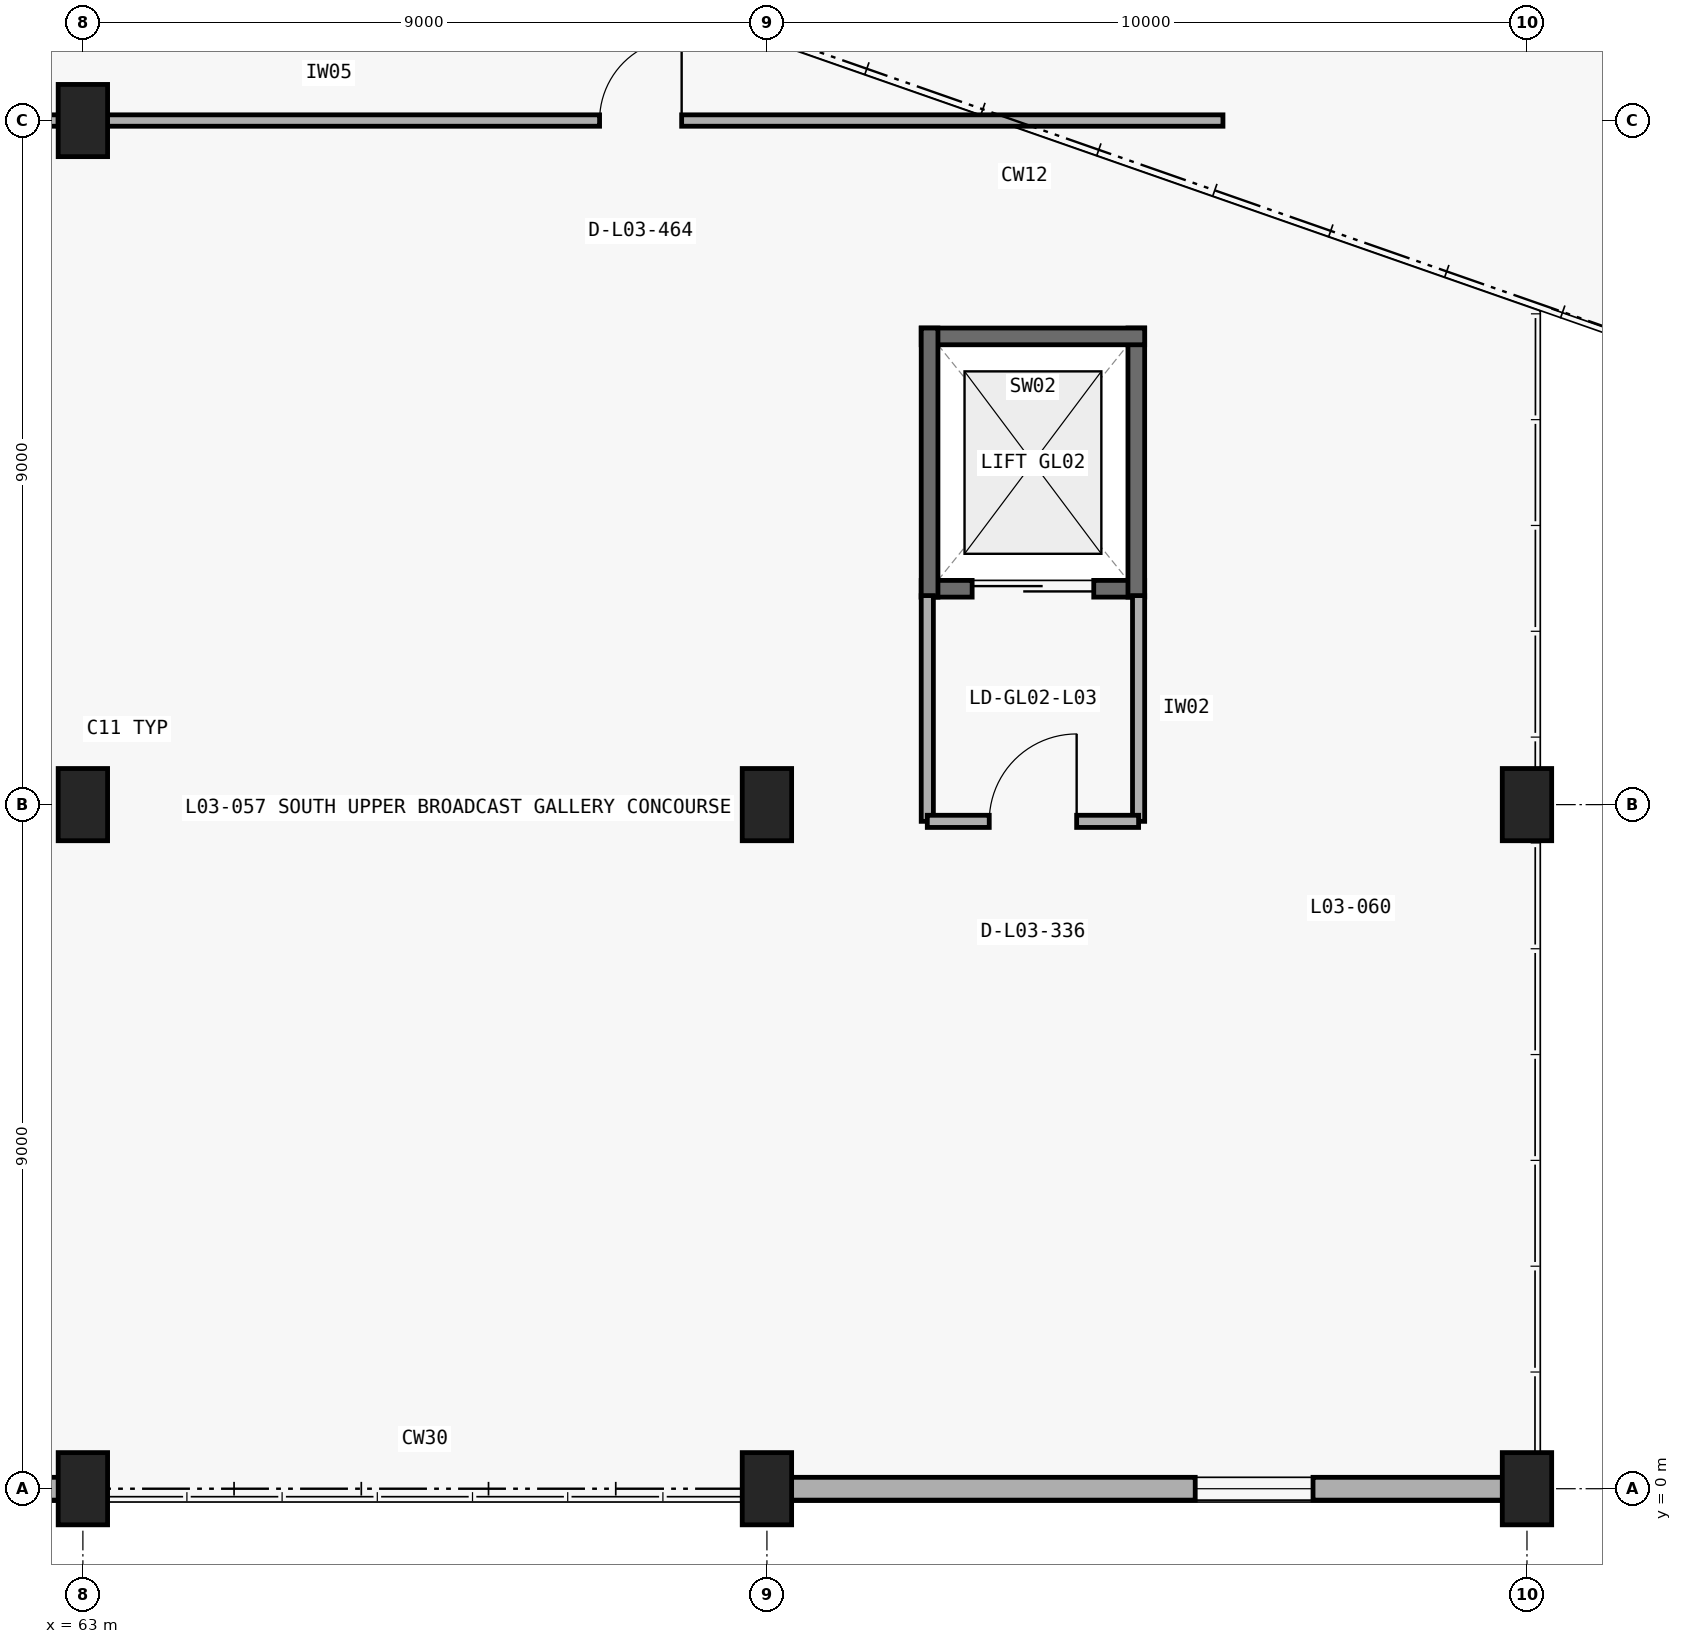
"""IFC4 building model, lengths in metres.
Left out: names, types, materials, properties, quantities, classifications, styles, units other than length and angle.
Written with IfcOpenShell. Run it as: python <this file> out.ifc"""

import sys

from ifc_helpers import new_model, si_unit, direction, frame, frame_2d, origin, origin_2d, place, context, subcontext, project, spatial, rectangle, extrude, element, fill, save


model = new_model("IFC4")
c1 = context("Model", 3, precision=1e-05, world=origin(), true_north=direction((0.0, 1.0)))
c2 = subcontext(c1, "Body", "Model", "MODEL_VIEW")
j1 = project(units=[si_unit("LENGTHUNIT", "METRE"), si_unit("PLANEANGLEUNIT", "RADIAN")], contexts=[c1])
p1 = place(None, origin())
s1 = spatial("IfcSite", under=j1, at=p1, CompositionType="ELEMENT")
p2 = place(p1, origin())
s2 = spatial("IfcBuilding", under=s1, at=p2, CompositionType="ELEMENT")
p3 = place(p2, frame((0.0, 0.0, 15.0)))
s3 = spatial("IfcBuildingStorey", under=s2, at=p3, CompositionType="ELEMENT", Elevation=15.0)
for number, where, z_axis, x_axis in (
    (1, (63.0, 0.0, 0.0), (0.0, 0.0, 1.0), (1.0, 0.0, 0.0)),
    (2, (63.0, 9.0, 0.0), (0.0, 0.0, 1.0), (1.0, 0.0, 0.0)),
    (3, (63.0, 18.0, 0.0), (0.0, 0.0, 1.0), (1.0, 0.0, 0.0)),
    (4, (72.0, 0.0, 0.0), (0.0, 0.0, 1.0), (1.0, 0.0, 0.0)),
    (5, (72.0, 9.0, 0.0), (0.0, 0.0, 1.0), (1.0, 0.0, 0.0)),
    (6, (82.0, 0.0, 0.0), (0.0, 0.0, 1.0), (1.0, 0.0, 0.0)),
    (7, (82.0, 9.0, 0.0), (0.0, 0.0, 1.0), (1.0, 0.0, 0.0)),
):
    element("IfcColumn", number, at=place(p3, frame(where, z_axis=z_axis, x_axis=x_axis)), inside=s3, PredefinedType="COLUMN", context=c2, shape_type="SweptSolid", body=[
        extrude(rectangle(XDim=0.65, YDim=0.95, at=origin_2d()), origin(), (0.0, 0.0, 1.0), 4.8),
    ])
p4 = place(p3, frame((81.7, 0.0, 0.0), z_axis=(0.0, 0.0, 1.0), x_axis=(-1.0, 0.0, 0.0)))
e8 = element("IfcWall", 8, at=p4, inside=s3, PredefinedType="STANDARD", context=c2, shape_type="SweptSolid", body=[
    extrude(rectangle(XDim=9.4, YDim=0.3, at=frame_2d((4.7, 0.0))), origin(), (0.0, 0.0, 1.0), 3.823),
])
p5 = place(p4, frame((2.515, 0.0, 0.95)))
e9 = element("IfcOpeningElement", 9, at=p5, cuts=e8, PredefinedType="OPENING", context=c2, shape_type="SweptSolid", body=[
    extrude(rectangle(XDim=1.55, YDim=1.95, at=frame_2d((0.775, 0.975))), frame((0.0, 0.16, 0.0), z_axis=(0.0, -1.0, 0.0), x_axis=(1.0, 0.0, 0.0)), (0.0, 0.0, 1.0), 0.32),
])
p6 = place(p3, frame((62.7, 0.0, 0.0), z_axis=(0.0, 0.0, 1.0), x_axis=(-1.0, 0.0, 0.0)))
e10 = element("IfcWall", 10, at=p6, inside=s3, PredefinedType="STANDARD", context=c2, shape_type="SweptSolid", body=[
    extrude(rectangle(XDim=8.4, YDim=0.3, at=frame_2d((4.2, 0.0))), origin(), (0.0, 0.0, 1.0), 3.823),
])
p7 = place(p6, frame((2.065, 0.0, 0.95)))
e11 = element("IfcOpeningElement", 11, at=p7, cuts=e10, PredefinedType="OPENING", context=c2, shape_type="SweptSolid", body=[
    extrude(rectangle(XDim=1.75, YDim=2.1, at=frame_2d((0.875, 1.05))), frame((0.0, 0.16, 0.0), z_axis=(0.0, -1.0, 0.0), x_axis=(1.0, 0.0, 0.0)), (0.0, 0.0, 1.0), 0.32),
])
p8 = place(p3, frame((74.03, 11.84, 0.0), z_axis=(0.0, 0.0, 1.0), x_axis=(1.0, 0.0, 0.0)))
e12 = element("IfcWall", 12, at=p8, inside=s3, PredefinedType="SHEAR", context=c2, shape_type="SweptSolid", body=[
    extrude(rectangle(XDim=2.94, YDim=0.22, at=frame_2d((1.47, 0.0))), origin(), (0.0, 0.0, 1.0), 4.54),
])
p9 = place(p8, frame((0.67, 0.0, 0.0)))
e13 = element("IfcOpeningElement", 13, at=p9, cuts=e12, PredefinedType="OPENING", context=c2, shape_type="SweptSolid", body=[
    extrude(rectangle(XDim=1.6, YDim=2.3, at=frame_2d((0.8, 1.15))), frame((0.0, 0.12, 0.0), z_axis=(0.0, -1.0, 0.0), x_axis=(1.0, 0.0, 0.0)), (0.0, 0.0, 1.0), 0.24),
])
p10 = place(p3, frame((76.86, 11.73, 0.0), z_axis=(0.0, 0.0, 1.0), x_axis=(0.0, 1.0, 0.0)))
e14 = element("IfcWall", 14, at=p10, inside=s3, PredefinedType="SHEAR", context=c2, shape_type="SweptSolid", body=[
    extrude(rectangle(XDim=3.54, YDim=0.22, at=frame_2d((1.77, 0.0))), origin(), (0.0, 0.0, 1.0), 4.54),
])
p11 = place(p3, frame((76.97, 15.16, 0.0), z_axis=(0.0, 0.0, 1.0), x_axis=(-1.0, 0.0, 0.0)))
e15 = element("IfcWall", 15, at=p11, inside=s3, PredefinedType="SHEAR", context=c2, shape_type="SweptSolid", body=[
    extrude(rectangle(XDim=2.94, YDim=0.22, at=frame_2d((1.47, 0.0))), origin(), (0.0, 0.0, 1.0), 4.54),
])
p12 = place(p3, frame((74.14, 15.27, 0.0), z_axis=(0.0, 0.0, 1.0), x_axis=(0.0, -1.0, 0.0)))
e16 = element("IfcWall", 16, at=p12, inside=s3, PredefinedType="SHEAR", context=c2, shape_type="SweptSolid", body=[
    extrude(rectangle(XDim=3.54, YDim=0.22, at=frame_2d((1.77, 0.0))), origin(), (0.0, 0.0, 1.0), 4.54),
])
for number, where, z_axis, x_axis in (
    (17, (74.11, 11.75, 0.0), (0.0, 0.0, 1.0), (0.0, -1.0, 0.0)),
    (18, (76.89, 11.75, 0.0), (0.0, 0.0, 1.0), (0.0, -1.0, 0.0)),
):
    element("IfcWall", number, at=place(p3, frame(where, z_axis=z_axis, x_axis=x_axis)), inside=s3, PredefinedType="PARTITIONING", context=c2, shape_type="SweptSolid", body=[
        extrude(rectangle(XDim=2.97, YDim=0.16, at=frame_2d((1.485, 0.0))), origin(), (0.0, 0.0, 1.0), 3.823),
    ])
p13 = place(p3, frame((74.11, 8.78, 0.0), z_axis=(0.0, 0.0, 1.0), x_axis=(1.0, 0.0, 0.0)))
e19 = element("IfcWall", 19, at=p13, inside=s3, PredefinedType="PARTITIONING", context=c2, shape_type="SweptSolid", body=[
    extrude(rectangle(XDim=2.78, YDim=0.16, at=frame_2d((1.39, 0.0))), origin(), (0.0, 0.0, 1.0), 3.823),
])
p14 = place(p13, frame((0.815, 0.0, 0.0)))
e20 = element("IfcOpeningElement", 20, at=p14, cuts=e19, PredefinedType="OPENING", context=c2, shape_type="SweptSolid", body=[
    extrude(rectangle(XDim=1.15, YDim=2.2, at=frame_2d((0.575, 1.1))), frame((0.0, 0.09, 0.0), z_axis=(0.0, -1.0, 0.0), x_axis=(1.0, 0.0, 0.0)), (0.0, 0.0, 1.0), 0.18),
])
p15 = place(p3, frame((17.675, 18.0, 0.0), z_axis=(0.0, 0.0, 1.0), x_axis=(1.0, 0.0, 0.0)))
e21 = element("IfcWall", 21, at=p15, inside=s3, PredefinedType="PARTITIONING", context=c2, shape_type="SweptSolid", body=[
    extrude(rectangle(XDim=45.015, YDim=0.15, at=frame_2d((22.507, 0.0))), origin(), (0.0, 0.0, 1.0), 3.823),
])
p16 = place(p15, frame((21.998, 0.0, 0.0)))
e22 = element("IfcOpeningElement", 22, at=p16, cuts=e21, PredefinedType="OPENING", context=c2, shape_type="SweptSolid", body=[
    extrude(rectangle(XDim=1.02, YDim=2.2, at=frame_2d((0.51, 1.1))), frame((0.0, 0.085, 0.0), z_axis=(0.0, -1.0, 0.0), x_axis=(1.0, 0.0, 0.0)), (0.0, 0.0, 1.0), 0.17),
])
p17 = place(p3, frame((62.675, 18.0, 0.0), z_axis=(0.0, 0.0, 1.0), x_axis=(1.0, 0.0, 0.0)))
e23 = element("IfcWall", 23, at=p17, inside=s3, PredefinedType="PARTITIONING", context=c2, shape_type="SweptSolid", body=[
    extrude(rectangle(XDim=15.325, YDim=0.15, at=frame_2d((7.663, 0.0))), origin(), (0.0, 0.0, 1.0), 4.52),
])
p18 = place(p17, frame((7.123, 0.0, 0.0)))
e24 = element("IfcOpeningElement", 24, at=p18, cuts=e23, PredefinedType="OPENING", context=c2, shape_type="SweptSolid", body=[
    extrude(rectangle(XDim=1.08, YDim=2.2, at=frame_2d((0.54, 1.1))), frame((0.0, 0.085, 0.0), z_axis=(0.0, -1.0, 0.0), x_axis=(1.0, 0.0, 0.0)), (0.0, 0.0, 1.0), 0.17),
])
p19 = place(p5, origin())
e25 = element("IfcWindow", 25, at=p19, inside=s3, PartitioningType="SINGLE_PANEL", PredefinedType="WINDOW", context=c2, shape_type="SweptSolid", body=[
    extrude(rectangle(XDim=1.55, YDim=1.95, at=frame_2d((0.775, 0.975))), frame((0.0, 0.03, 0.0), z_axis=(0.0, -1.0, 0.0), x_axis=(1.0, 0.0, 0.0)), (0.0, 0.0, 1.0), 0.06),
])
fill(e9, e25)
p20 = place(p9, origin())
e26 = element("IfcDoor", 26, at=p20, inside=s3, OperationType="SLIDING_TO_LEFT", PredefinedType="DOOR", context=c2, shape_type="SweptSolid", body=[
    extrude(rectangle(XDim=1.6, YDim=2.3, at=frame_2d((0.8, 1.15))), frame((0.0, 0.025, 0.0), z_axis=(0.0, -1.0, 0.0), x_axis=(1.0, 0.0, 0.0)), (0.0, 0.0, 1.0), 0.05),
])
fill(e13, e26)
p21 = place(p14, origin())
e27 = element("IfcDoor", 27, at=p21, inside=s3, OperationType="SINGLE_SWING_RIGHT", PredefinedType="DOOR", context=c2, shape_type="SweptSolid", body=[
    extrude(rectangle(XDim=1.15, YDim=2.2, at=frame_2d((0.575, 1.1))), frame((0.0, 0.025, 0.0), z_axis=(0.0, -1.0, 0.0), x_axis=(1.0, 0.0, 0.0)), (0.0, 0.0, 1.0), 0.05),
])
fill(e20, e27)
p22 = place(p18, origin())
e28 = element("IfcDoor", 28, at=p22, inside=s3, OperationType="SINGLE_SWING_RIGHT", PredefinedType="DOOR", context=c2, shape_type="SweptSolid", body=[
    extrude(rectangle(XDim=1.08, YDim=2.2, at=frame_2d((0.54, 1.1))), frame((0.0, 0.025, 0.0), z_axis=(0.0, -1.0, 0.0), x_axis=(1.0, 0.0, 0.0)), (0.0, 0.0, 1.0), 0.05),
])
fill(e24, e28)
save(model, sys.argv[1])
